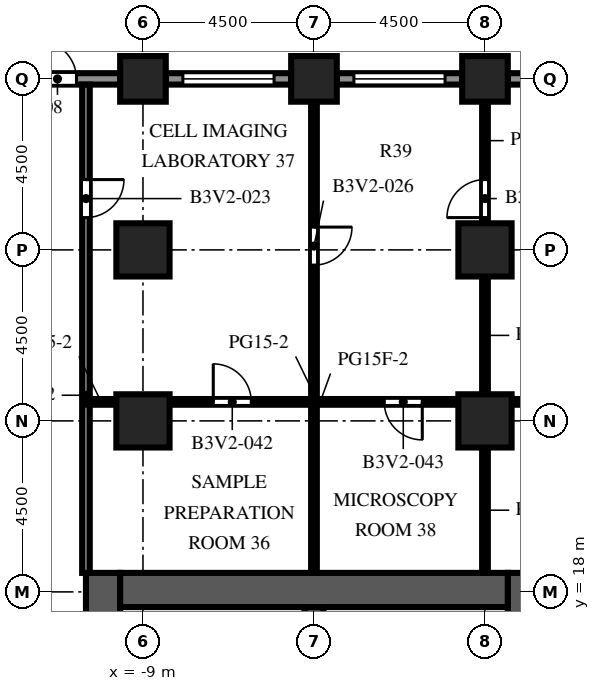
"""IFC4 building model, lengths in metres.
Left out: names, types, materials, properties, quantities, classifications, styles, units other than length and angle.
Written with IfcOpenShell. Run it as: python <this file> out.ifc"""

import sys

from ifc_helpers import new_model, si_unit, direction, frame, frame_2d, origin, origin_2d, place, context, subcontext, project, spatial, rectangle, extrude, element, fill, save


model = new_model("IFC4")
c1 = context("Model", 3, precision=1e-05, world=origin(), true_north=direction((0.0, 1.0)))
c2 = subcontext(c1, "Body", "Model", "MODEL_VIEW")
j1 = project(units=[si_unit("LENGTHUNIT", "METRE"), si_unit("PLANEANGLEUNIT", "RADIAN")], contexts=[c1])
p1 = place(None, origin())
s1 = spatial("IfcSite", under=j1, at=p1, CompositionType="ELEMENT")
p2 = place(p1, origin())
s2 = spatial("IfcBuilding", under=s1, at=p2, CompositionType="ELEMENT")
p3 = place(p2, frame((0.0, 0.0, 106.6)))
s3 = spatial("IfcBuildingStorey", under=s2, at=p3, CompositionType="ELEMENT", Elevation=106.6)
for number, where, z_axis, x_axis in (
    (1, (-9.0, 31.5, 0.0), (0.0, 0.0, 1.0), (1.0, 0.0, 0.0)),
    (2, (-4.5, 31.5, 0.0), (0.0, 0.0, 1.0), (1.0, 0.0, 0.0)),
    (3, (0.0, 31.5, 0.0), (0.0, 0.0, 1.0), (1.0, 0.0, 0.0)),
):
    element("IfcColumn", number, at=place(p3, frame(where, z_axis=z_axis, x_axis=x_axis)), inside=s3, PredefinedType="COLUMN", context=c2, shape_type="SweptSolid", body=[
        extrude(rectangle(XDim=1.2, YDim=1.2, at=origin_2d()), origin(), (0.0, 0.0, 1.0), 4.1),
    ])
for number, where, z_axis, x_axis in (
    (4, (-9.0, 22.5, 0.0), (0.0, 0.0, 1.0), (1.0, 0.0, 0.0)),
    (5, (-9.0, 27.0, 0.0), (0.0, 0.0, 1.0), (1.0, 0.0, 0.0)),
    (6, (0.0, 22.5, 0.0), (0.0, 0.0, 1.0), (1.0, 0.0, 0.0)),
    (7, (0.0, 27.0, 0.0), (0.0, 0.0, 1.0), (1.0, 0.0, 0.0)),
):
    element("IfcColumn", number, at=place(p3, frame(where, z_axis=z_axis, x_axis=x_axis)), inside=s3, PredefinedType="COLUMN", context=c2, shape_type="SweptSolid", body=[
        extrude(rectangle(XDim=1.4, YDim=1.4, at=origin_2d()), origin(), (0.0, 0.0, 1.0), 4.1),
    ])
p4 = place(p3, frame((-10.05, -9.0, 0.0), z_axis=(0.0, 0.0, 1.0), x_axis=(0.0, 1.0, 0.0)))
e8 = element("IfcWall", 8, at=p4, inside=s3, PredefinedType="SHEAR", context=c2, shape_type="SweptSolid", body=[
    extrude(rectangle(XDim=27.5, YDim=0.9, at=frame_2d((13.75, 0.0))), origin(), (0.0, 0.0, 1.0), 4.1),
])
p5 = place(p4, frame((12.55, 0.0, 0.0)))
e9 = element("IfcOpeningElement", 9, at=p5, cuts=e8, PredefinedType="OPENING", context=c2, shape_type="SweptSolid", body=[
    extrude(rectangle(XDim=2.4, YDim=2.4, at=frame_2d((1.2, 1.2))), frame((0.0, 0.46, 0.0), z_axis=(0.0, -1.0, 0.0), x_axis=(1.0, 0.0, 0.0)), (0.0, 0.0, 1.0), 0.92),
])
p6 = place(p4, frame((6.825, 0.0, 0.0)))
e10 = element("IfcOpeningElement", 10, at=p6, cuts=e8, PredefinedType="OPENING", context=c2, shape_type="SweptSolid", body=[
    extrude(rectangle(XDim=1.2, YDim=2.1, at=frame_2d((0.6, 1.05))), frame((0.0, 0.46, 0.0), z_axis=(0.0, -1.0, 0.0), x_axis=(1.0, 0.0, 0.0)), (0.0, 0.0, 1.0), 0.92),
])
p7 = place(p4, frame((19.475, 0.0, 0.0)))
e11 = element("IfcOpeningElement", 11, at=p7, cuts=e8, PredefinedType="OPENING", context=c2, shape_type="SweptSolid", body=[
    extrude(rectangle(XDim=1.2, YDim=2.1, at=frame_2d((0.6, 1.05))), frame((0.0, 0.46, 0.0), z_axis=(0.0, -1.0, 0.0), x_axis=(1.0, 0.0, 0.0)), (0.0, 0.0, 1.0), 0.92),
])
p8 = place(p3, frame((1.05, -9.0, 0.0), z_axis=(0.0, 0.0, 1.0), x_axis=(0.0, 1.0, 0.0)))
e12 = element("IfcWall", 12, at=p8, inside=s3, PredefinedType="SHEAR", context=c2, shape_type="SweptSolid", body=[
    extrude(rectangle(XDim=27.5, YDim=0.9, at=frame_2d((13.75, 0.0))), origin(), (0.0, 0.0, 1.0), 4.1),
])
p9 = place(p8, frame((12.55, 0.0, 0.0)))
e13 = element("IfcOpeningElement", 13, at=p9, cuts=e12, PredefinedType="OPENING", context=c2, shape_type="SweptSolid", body=[
    extrude(rectangle(XDim=2.4, YDim=2.4, at=frame_2d((1.2, 1.2))), frame((0.0, 0.46, 0.0), z_axis=(0.0, -1.0, 0.0), x_axis=(1.0, 0.0, 0.0)), (0.0, 0.0, 1.0), 0.92),
])
p10 = place(p8, frame((3.893, 0.0, 0.0)))
e14 = element("IfcOpeningElement", 14, at=p10, cuts=e12, PredefinedType="OPENING", context=c2, shape_type="SweptSolid", body=[
    extrude(rectangle(XDim=0.923, YDim=2.1, at=frame_2d((0.461, 1.05))), frame((0.0, 0.46, 0.0), z_axis=(0.0, -1.0, 0.0), x_axis=(1.0, 0.0, 0.0)), (0.0, 0.0, 1.0), 0.92),
])
p11 = place(p8, frame((23.427, 0.0, 0.0)))
e15 = element("IfcOpeningElement", 15, at=p11, cuts=e12, PredefinedType="OPENING", context=c2, shape_type="SweptSolid", body=[
    extrude(rectangle(XDim=1.2, YDim=2.1, at=frame_2d((0.6, 1.05))), frame((0.0, 0.46, 0.0), z_axis=(0.0, -1.0, 0.0), x_axis=(1.0, 0.0, 0.0)), (0.0, 0.0, 1.0), 0.92),
])
p12 = place(p3, frame((-9.6, 18.05, 0.0), z_axis=(0.0, 0.0, 1.0), x_axis=(1.0, 0.0, 0.0)))
e16 = element("IfcWall", 16, at=p12, inside=s3, PredefinedType="SHEAR", context=c2, shape_type="SweptSolid", body=[
    extrude(rectangle(XDim=10.2, YDim=0.9, at=frame_2d((5.1, 0.0))), origin(), (0.0, 0.0, 1.0), 4.1),
])
p13 = place(p3, frame((-4.5, 10.25, 0.0), z_axis=(0.0, 0.0, 1.0), x_axis=(0.0, 1.0, 0.0)))
e17 = element("IfcWall", 17, at=p13, inside=s3, PredefinedType="SHEAR", context=c2, shape_type="SweptSolid", body=[
    extrude(rectangle(XDim=7.35, YDim=0.5, at=frame_2d((3.675, 0.0))), origin(), (0.0, 0.0, 1.0), 4.1),
])
p14 = place(p3, frame((0.6, 31.5, 0.0), z_axis=(0.0, 0.0, 1.0), x_axis=(1.0, 0.0, 0.0)))
e18 = element("IfcWall", 18, at=p14, inside=s3, PredefinedType="SOLIDWALL", context=c2, shape_type="SweptSolid", body=[
    extrude(rectangle(XDim=3.3, YDim=0.3, at=frame_2d((1.65, 0.0))), origin(), (0.0, 0.0, 1.0), 2.6),
])
p15 = place(p14, frame((0.45, 0.0, 0.8)))
e19 = element("IfcOpeningElement", 19, at=p15, cuts=e18, PredefinedType="OPENING", context=c2, shape_type="SweptSolid", body=[
    extrude(rectangle(XDim=2.4, YDim=1.7, at=frame_2d((1.2, 0.85))), frame((0.0, 0.16, 0.0), z_axis=(0.0, -1.0, 0.0), x_axis=(1.0, 0.0, 0.0)), (0.0, 0.0, 1.0), 0.32),
])
p16 = place(p3, frame((-3.9, 31.5, 0.0), z_axis=(0.0, 0.0, 1.0), x_axis=(1.0, 0.0, 0.0)))
e20 = element("IfcWall", 20, at=p16, inside=s3, PredefinedType="SOLIDWALL", context=c2, shape_type="SweptSolid", body=[
    extrude(rectangle(XDim=3.3, YDim=0.3, at=frame_2d((1.65, 0.0))), origin(), (0.0, 0.0, 1.0), 2.6),
])
p17 = place(p16, frame((0.45, 0.0, 0.8)))
e21 = element("IfcOpeningElement", 21, at=p17, cuts=e20, PredefinedType="OPENING", context=c2, shape_type="SweptSolid", body=[
    extrude(rectangle(XDim=2.4, YDim=1.7, at=frame_2d((1.2, 0.85))), frame((0.0, 0.16, 0.0), z_axis=(0.0, -1.0, 0.0), x_axis=(1.0, 0.0, 0.0)), (0.0, 0.0, 1.0), 0.32),
])
p18 = place(p3, frame((-8.4, 31.5, 0.0), z_axis=(0.0, 0.0, 1.0), x_axis=(1.0, 0.0, 0.0)))
e22 = element("IfcWall", 22, at=p18, inside=s3, PredefinedType="SOLIDWALL", context=c2, shape_type="SweptSolid", body=[
    extrude(rectangle(XDim=3.3, YDim=0.3, at=frame_2d((1.65, 0.0))), origin(), (0.0, 0.0, 1.0), 2.6),
])
p19 = place(p18, frame((0.45, 0.0, 0.8)))
e23 = element("IfcOpeningElement", 23, at=p19, cuts=e22, PredefinedType="OPENING", context=c2, shape_type="SweptSolid", body=[
    extrude(rectangle(XDim=2.4, YDim=1.7, at=frame_2d((1.2, 0.85))), frame((0.0, 0.16, 0.0), z_axis=(0.0, -1.0, 0.0), x_axis=(1.0, 0.0, 0.0)), (0.0, 0.0, 1.0), 0.32),
])
p20 = place(p3, frame((-12.9, 31.5, 0.0), z_axis=(0.0, 0.0, 1.0), x_axis=(1.0, 0.0, 0.0)))
e24 = element("IfcWall", 24, at=p20, inside=s3, PredefinedType="SOLIDWALL", context=c2, shape_type="SweptSolid", body=[
    extrude(rectangle(XDim=3.3, YDim=0.3, at=frame_2d((1.65, 0.0))), origin(), (0.0, 0.0, 1.0), 2.6),
])
p21 = place(p20, frame((1.15, 0.0, 0.0)))
e25 = element("IfcOpeningElement", 25, at=p21, cuts=e24, PredefinedType="OPENING", context=c2, shape_type="SweptSolid", body=[
    extrude(rectangle(XDim=1.0, YDim=2.2, at=frame_2d((0.5, 1.1))), frame((0.0, 0.16, 0.0), z_axis=(0.0, -1.0, 0.0), x_axis=(1.0, 0.0, 0.0)), (0.0, 0.0, 1.0), 0.32),
])
p22 = place(p3, frame((-0.7, 15.028, 0.0), z_axis=(0.0, 0.0, 1.0), x_axis=(0.0, 1.0, 0.0)))
e26 = element("IfcWall", 26, at=p22, inside=s3, PredefinedType="PARTITIONING", context=c2, shape_type="SweptSolid", body=[
    extrude(rectangle(XDim=2.573, YDim=0.1, at=frame_2d((1.286, 0.0))), origin(), (0.0, 0.0, 1.0), 3.5),
])
p23 = place(p22, frame((0.786, 0.0, 0.0)))
e27 = element("IfcOpeningElement", 27, at=p23, cuts=e26, PredefinedType="OPENING", context=c2, shape_type="SweptSolid", body=[
    extrude(rectangle(XDim=1.0, YDim=2.1, at=frame_2d((0.5, 1.05))), frame((0.0, 0.06, 0.0), z_axis=(0.0, -1.0, 0.0), x_axis=(1.0, 0.0, 0.0)), (0.0, 0.0, 1.0), 0.12),
])
p24 = place(p3, frame((-10.5, 31.35, 0.0), z_axis=(0.0, 0.0, 1.0), x_axis=(0.0, -1.0, 0.0)))
e28 = element("IfcWall", 28, at=p24, inside=s3, PredefinedType="PARTITIONING", context=c2, shape_type="SweptSolid", body=[
    extrude(rectangle(XDim=12.85, YDim=0.2, at=frame_2d((6.425, 0.0))), origin(), (0.0, 0.0, 1.0), 3.5),
])
p25 = place(p24, frame((2.5, 0.0, 0.0)))
e29 = element("IfcOpeningElement", 29, at=p25, cuts=e28, PredefinedType="OPENING", context=c2, shape_type="SweptSolid", body=[
    extrude(rectangle(XDim=1.0, YDim=2.1, at=frame_2d((0.5, 1.05))), frame((0.0, 0.11, 0.0), z_axis=(0.0, -1.0, 0.0), x_axis=(1.0, 0.0, 0.0)), (0.0, 0.0, 1.0), 0.22),
])
p26 = place(p3, frame((-4.5, 30.9, 0.0), z_axis=(0.0, 0.0, 1.0), x_axis=(0.0, -1.0, 0.0)))
e30 = element("IfcWall", 30, at=p26, inside=s3, PredefinedType="PARTITIONING", context=c2, shape_type="SweptSolid", body=[
    extrude(rectangle(XDim=12.4, YDim=0.15, at=frame_2d((6.2, 0.0))), origin(), (0.0, 0.0, 1.0), 3.5),
])
p27 = place(p26, frame((3.3, 0.0, 0.0)))
e31 = element("IfcOpeningElement", 31, at=p27, cuts=e30, PredefinedType="OPENING", context=c2, shape_type="SweptSolid", body=[
    extrude(rectangle(XDim=1.0, YDim=2.1, at=frame_2d((0.5, 1.05))), frame((0.0, 0.085, 0.0), z_axis=(0.0, -1.0, 0.0), x_axis=(1.0, 0.0, 0.0)), (0.0, 0.0, 1.0), 0.17),
])
p28 = place(p3, frame((0.0, 18.5, 0.0), z_axis=(0.0, 0.0, 1.0), x_axis=(0.0, 1.0, 0.0)))
e32 = element("IfcWall", 32, at=p28, inside=s3, PredefinedType="PARTITIONING", context=c2, shape_type="SweptSolid", body=[
    extrude(rectangle(XDim=3.3, YDim=0.15, at=frame_2d((1.65, 0.0))), origin(), (0.0, 0.0, 1.0), 3.5),
])
p29 = place(p3, frame((0.0, 23.2, 0.0), z_axis=(0.0, 0.0, 1.0), x_axis=(0.0, 1.0, 0.0)))
e33 = element("IfcWall", 33, at=p29, inside=s3, PredefinedType="PARTITIONING", context=c2, shape_type="SweptSolid", body=[
    extrude(rectangle(XDim=3.1, YDim=0.15, at=frame_2d((1.55, 0.0))), origin(), (0.0, 0.0, 1.0), 3.5),
])
p30 = place(p3, frame((0.0, 30.9, 0.0), z_axis=(0.0, 0.0, 1.0), x_axis=(0.0, -1.0, 0.0)))
e34 = element("IfcWall", 34, at=p30, inside=s3, PredefinedType="PARTITIONING", context=c2, shape_type="SweptSolid", body=[
    extrude(rectangle(XDim=3.2, YDim=0.15, at=frame_2d((1.6, 0.0))), origin(), (0.0, 0.0, 1.0), 3.5),
])
p31 = place(p30, frame((2.05, 0.0, 0.0)))
e35 = element("IfcOpeningElement", 35, at=p31, cuts=e34, PredefinedType="OPENING", context=c2, shape_type="SweptSolid", body=[
    extrude(rectangle(XDim=1.0, YDim=2.1, at=frame_2d((0.5, 1.05))), frame((0.0, 0.085, 0.0), z_axis=(0.0, -1.0, 0.0), x_axis=(1.0, 0.0, 0.0)), (0.0, 0.0, 1.0), 0.17),
])
p32 = place(p3, frame((-10.5, 23.0, 0.0), z_axis=(0.0, 0.0, 1.0), x_axis=(1.0, 0.0, 0.0)))
e36 = element("IfcWall", 36, at=p32, inside=s3, PredefinedType="PARTITIONING", context=c2, shape_type="SweptSolid", body=[
    extrude(rectangle(XDim=0.8, YDim=0.15, at=frame_2d((0.4, 0.0))), origin(), (0.0, 0.0, 1.0), 3.5),
])
p33 = place(p3, frame((-0.7, 23.0, 0.0), z_axis=(0.0, 0.0, 1.0), x_axis=(-1.0, 0.0, 0.0)))
e37 = element("IfcWall", 37, at=p33, inside=s3, PredefinedType="PARTITIONING", context=c2, shape_type="SweptSolid", body=[
    extrude(rectangle(XDim=7.6, YDim=0.15, at=frame_2d((3.8, 0.0))), origin(), (0.0, 0.0, 1.0), 3.5),
])
p34 = place(p33, frame((5.45, 0.0, 0.0)))
e38 = element("IfcOpeningElement", 38, at=p34, cuts=e37, PredefinedType="OPENING", context=c2, shape_type="SweptSolid", body=[
    extrude(rectangle(XDim=1.0, YDim=2.1, at=frame_2d((0.5, 1.05))), frame((0.0, 0.085, 0.0), z_axis=(0.0, -1.0, 0.0), x_axis=(1.0, 0.0, 0.0)), (0.0, 0.0, 1.0), 0.17),
])
p35 = place(p33, frame((0.95, 0.0, 0.0)))
e39 = element("IfcOpeningElement", 39, at=p35, cuts=e37, PredefinedType="OPENING", context=c2, shape_type="SweptSolid", body=[
    extrude(rectangle(XDim=1.0, YDim=2.1, at=frame_2d((0.5, 1.05))), frame((0.0, 0.085, 0.0), z_axis=(0.0, -1.0, 0.0), x_axis=(1.0, 0.0, 0.0)), (0.0, 0.0, 1.0), 0.17),
])
p36 = place(p3, frame((8.3, 23.0, 0.0), z_axis=(0.0, 0.0, 1.0), x_axis=(-1.0, 0.0, 0.0)))
e40 = element("IfcWall", 40, at=p36, inside=s3, PredefinedType="PARTITIONING", context=c2, shape_type="SweptSolid", body=[
    extrude(rectangle(XDim=7.6, YDim=0.15, at=frame_2d((3.8, 0.0))), origin(), (0.0, 0.0, 1.0), 3.5),
])
p37 = place(p36, frame((3.95, 0.0, 0.0)))
e41 = element("IfcOpeningElement", 41, at=p37, cuts=e40, PredefinedType="OPENING", context=c2, shape_type="SweptSolid", body=[
    extrude(rectangle(XDim=1.0, YDim=2.1, at=frame_2d((0.5, 1.05))), frame((0.0, 0.085, 0.0), z_axis=(0.0, -1.0, 0.0), x_axis=(1.0, 0.0, 0.0)), (0.0, 0.0, 1.0), 0.17),
])
p38 = place(p17, origin())
e42 = element("IfcWindow", 42, at=p38, inside=s3, PartitioningType="SINGLE_PANEL", PredefinedType="WINDOW", context=c2, shape_type="SweptSolid", body=[
    extrude(rectangle(XDim=2.4, YDim=1.7, at=frame_2d((1.2, 0.85))), frame((0.0, 0.03, 0.0), z_axis=(0.0, -1.0, 0.0), x_axis=(1.0, 0.0, 0.0)), (0.0, 0.0, 1.0), 0.06),
])
fill(e21, e42)
p39 = place(p19, origin())
e43 = element("IfcWindow", 43, at=p39, inside=s3, PartitioningType="SINGLE_PANEL", PredefinedType="WINDOW", context=c2, shape_type="SweptSolid", body=[
    extrude(rectangle(XDim=2.4, YDim=1.7, at=frame_2d((1.2, 0.85))), frame((0.0, 0.03, 0.0), z_axis=(0.0, -1.0, 0.0), x_axis=(1.0, 0.0, 0.0)), (0.0, 0.0, 1.0), 0.06),
])
fill(e23, e43)
p40 = place(p21, origin())
e44 = element("IfcDoor", 44, at=p40, inside=s3, OperationType="SINGLE_SWING_LEFT", PredefinedType="DOOR", context=c2, shape_type="SweptSolid", body=[
    extrude(rectangle(XDim=1.0, YDim=2.2, at=frame_2d((0.5, 1.1))), frame((0.0, 0.025, 0.0), z_axis=(0.0, -1.0, 0.0), x_axis=(1.0, 0.0, 0.0)), (0.0, 0.0, 1.0), 0.05),
])
fill(e25, e44)
p41 = place(p25, origin())
e45 = element("IfcDoor", 45, at=p41, inside=s3, OperationType="SINGLE_SWING_LEFT", PredefinedType="DOOR", context=c2, shape_type="SweptSolid", body=[
    extrude(rectangle(XDim=1.0, YDim=2.1, at=frame_2d((0.5, 1.05))), frame((0.0, 0.025, 0.0), z_axis=(0.0, -1.0, 0.0), x_axis=(1.0, 0.0, 0.0)), (0.0, 0.0, 1.0), 0.05),
])
fill(e29, e45)
p42 = place(p27, origin())
e46 = element("IfcDoor", 46, at=p42, inside=s3, OperationType="SINGLE_SWING_LEFT", PredefinedType="DOOR", context=c2, shape_type="SweptSolid", body=[
    extrude(rectangle(XDim=1.0, YDim=2.1, at=frame_2d((0.5, 1.05))), frame((0.0, 0.025, 0.0), z_axis=(0.0, -1.0, 0.0), x_axis=(1.0, 0.0, 0.0)), (0.0, 0.0, 1.0), 0.05),
])
fill(e31, e46)
p43 = place(p31, origin())
e47 = element("IfcDoor", 47, at=p43, inside=s3, OperationType="SINGLE_SWING_RIGHT", PredefinedType="DOOR", context=c2, shape_type="SweptSolid", body=[
    extrude(rectangle(XDim=1.0, YDim=2.1, at=frame_2d((0.5, 1.05))), frame((0.0, 0.025, 0.0), z_axis=(0.0, -1.0, 0.0), x_axis=(1.0, 0.0, 0.0)), (0.0, 0.0, 1.0), 0.05),
])
fill(e35, e47)
p44 = place(p34, origin())
e48 = element("IfcDoor", 48, at=p44, inside=s3, OperationType="SINGLE_SWING_RIGHT", PredefinedType="DOOR", context=c2, shape_type="SweptSolid", body=[
    extrude(rectangle(XDim=1.0, YDim=2.1, at=frame_2d((0.5, 1.05))), frame((0.0, 0.025, 0.0), z_axis=(0.0, -1.0, 0.0), x_axis=(1.0, 0.0, 0.0)), (0.0, 0.0, 1.0), 0.05),
])
fill(e38, e48)
p45 = place(p35, origin())
e49 = element("IfcDoor", 49, at=p45, inside=s3, OperationType="SINGLE_SWING_LEFT", PredefinedType="DOOR", context=c2, shape_type="SweptSolid", body=[
    extrude(rectangle(XDim=1.0, YDim=2.1, at=frame_2d((0.5, 1.05))), frame((0.0, 0.025, 0.0), z_axis=(0.0, -1.0, 0.0), x_axis=(1.0, 0.0, 0.0)), (0.0, 0.0, 1.0), 0.05),
])
fill(e39, e49)
save(model, sys.argv[1])
